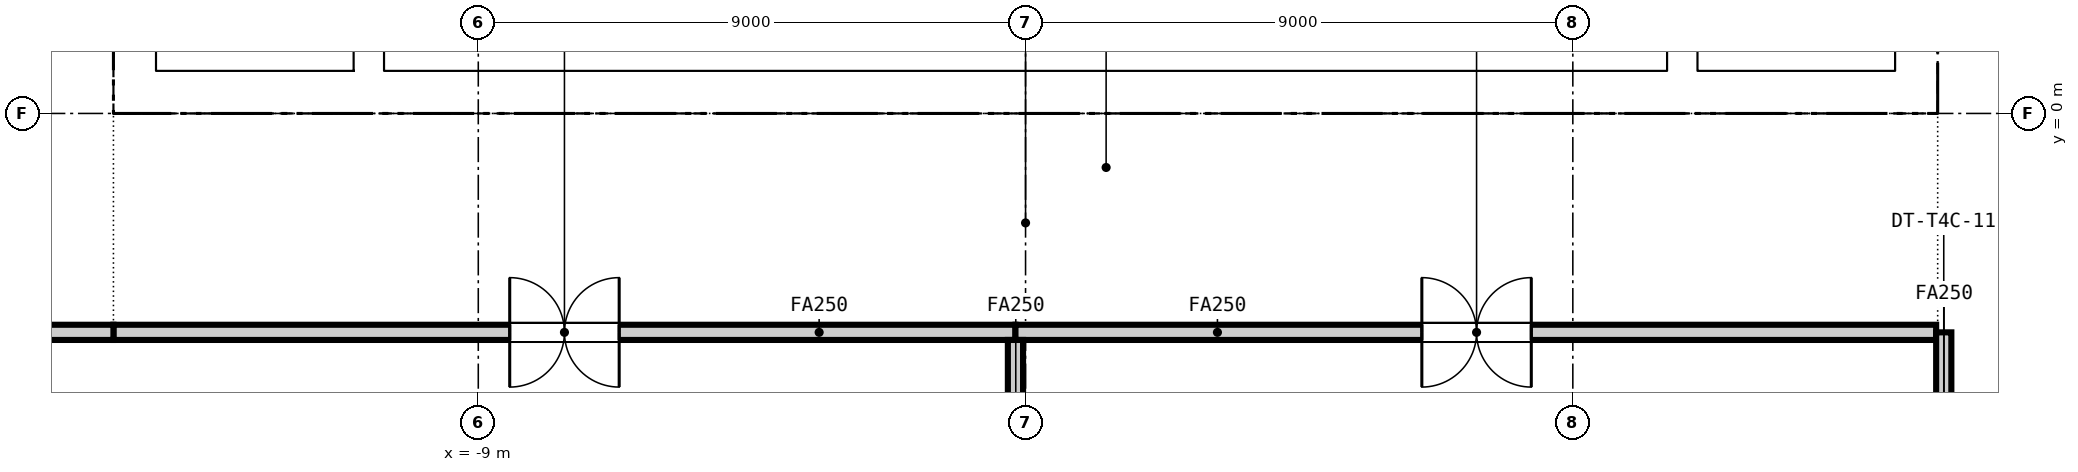
"""IFC4 building model, lengths in metres.
Left out: names, types, materials, properties, quantities, classifications, styles, units other than length and angle.
Written with IfcOpenShell. Run it as: python <this file> out.ifc"""

import sys

from ifc_helpers import new_model, si_unit, direction, frame, frame_2d, origin, place, context, subcontext, project, spatial, rectangle, extrude, element, fill, save


model = new_model("IFC4")
c1 = context("Model", 3, precision=1e-05, world=origin(), true_north=direction((0.0, 1.0)))
c2 = subcontext(c1, "Body", "Model", "MODEL_VIEW")
j1 = project(units=[si_unit("LENGTHUNIT", "METRE"), si_unit("PLANEANGLEUNIT", "RADIAN")], contexts=[c1])
p1 = place(None, origin())
s1 = spatial("IfcSite", under=j1, at=p1, CompositionType="ELEMENT")
p2 = place(p1, origin())
s2 = spatial("IfcBuilding", under=s1, at=p2, CompositionType="ELEMENT")
p3 = place(p2, frame((0.0, 0.0, 192.7)))
s3 = spatial("IfcBuildingStorey", under=s2, at=p3, CompositionType="ELEMENT", Elevation=192.7)
p4 = place(p3, frame((-15.0, 0.35, -0.15), z_axis=(0.0, 0.0, 1.0), x_axis=(1.0, 0.0, 0.0)))
e1 = element("IfcWall", 1, at=p4, inside=s3, PredefinedType="SOLIDWALL", context=c2, shape_type="SweptSolid", body=[
    extrude(rectangle(XDim=30.0, YDim=0.7, at=frame_2d((15.0, 0.0))), origin(), (0.0, 0.0, 1.0), 3.65),
])
p5 = place(p4, frame((5.8, 0.0, 0.15)))
e2 = element("IfcOpeningElement", 2, at=p5, cuts=e1, PredefinedType="OPENING", context=c2, shape_type="SweptSolid", body=[
    extrude(rectangle(XDim=2.4, YDim=2.4, at=frame_2d((1.2, 1.2))), frame((0.0, 0.36, 0.0), z_axis=(0.0, -1.0, 0.0), x_axis=(1.0, 0.0, 0.0)), (0.0, 0.0, 1.0), 0.72),
])
p6 = place(p4, frame((13.8, 0.0, 0.15)))
e3 = element("IfcOpeningElement", 3, at=p6, cuts=e1, PredefinedType="OPENING", context=c2, shape_type="SweptSolid", body=[
    extrude(rectangle(XDim=2.4, YDim=2.4, at=frame_2d((1.2, 1.2))), frame((0.0, 0.36, 0.0), z_axis=(0.0, -1.0, 0.0), x_axis=(1.0, 0.0, 0.0)), (0.0, 0.0, 1.0), 0.72),
])
p7 = place(p4, frame((21.8, 0.0, 0.15)))
e4 = element("IfcOpeningElement", 4, at=p7, cuts=e1, PredefinedType="OPENING", context=c2, shape_type="SweptSolid", body=[
    extrude(rectangle(XDim=2.4, YDim=2.4, at=frame_2d((1.2, 1.2))), frame((0.0, 0.36, 0.0), z_axis=(0.0, -1.0, 0.0), x_axis=(1.0, 0.0, 0.0)), (0.0, 0.0, 1.0), 0.72),
])
p8 = place(p4, frame((1.5, 0.0, 0.15)))
e5 = element("IfcOpeningElement", 5, at=p8, cuts=e1, PredefinedType="OPENING", context=c2, shape_type="SweptSolid", body=[
    extrude(rectangle(XDim=1.2, YDim=2.1, at=frame_2d((0.6, 1.05))), frame((0.0, 0.36, 0.0), z_axis=(0.0, -1.0, 0.0), x_axis=(1.0, 0.0, 0.0)), (0.0, 0.0, 1.0), 0.72),
])
p9 = place(p4, frame((27.3, 0.0, 0.15)))
e6 = element("IfcOpeningElement", 6, at=p9, cuts=e1, PredefinedType="OPENING", context=c2, shape_type="SweptSolid", body=[
    extrude(rectangle(XDim=1.2, YDim=2.1, at=frame_2d((0.6, 1.05))), frame((0.0, 0.36, 0.0), z_axis=(0.0, -1.0, 0.0), x_axis=(1.0, 0.0, 0.0)), (0.0, 0.0, 1.0), 0.72),
])
for number, where, z_axis, x_axis in (
    (7, (-14.65, 0.7, -0.15), (0.0, 0.0, 1.0), (0.0, 1.0, 0.0)),
    (8, (14.65, 0.7, -0.15), (0.0, 0.0, 1.0), (0.0, 1.0, 0.0)),
):
    element("IfcWall", number, at=place(p3, frame(where, z_axis=z_axis, x_axis=x_axis)), inside=s3, PredefinedType="SOLIDWALL", context=c2, shape_type="SweptSolid", body=[
        extrude(rectangle(XDim=13.6, YDim=0.7, at=frame_2d((6.8, 0.0))), origin(), (0.0, 0.0, 1.0), 3.65),
    ])
for number, where, z_axis, x_axis in (
    (9, (-10.8, 0.7, -0.15), (0.0, 0.0, 1.0), (0.0, 1.0, 0.0)),
    (10, (10.8, 0.7, -0.15), (0.0, 0.0, 1.0), (0.0, 1.0, 0.0)),
):
    element("IfcWall", number, at=place(p3, frame(where, z_axis=z_axis, x_axis=x_axis)), inside=s3, PredefinedType="SOLIDWALL", context=c2, shape_type="SweptSolid", body=[
        extrude(rectangle(XDim=13.6, YDim=0.5, at=frame_2d((6.8, 0.0))), origin(), (0.0, 0.0, 1.0), 3.65),
    ])
for number, where, z_axis, x_axis in (
    (11, (-14.15, 0.7, 0.0), (0.0, 0.0, 1.0), (0.0, 1.0, 0.0)),
    (12, (14.15, 0.7, 0.0), (0.0, 0.0, 1.0), (0.0, 1.0, 0.0)),
):
    element("IfcWall", number, at=place(p3, frame(where, z_axis=z_axis, x_axis=x_axis)), inside=s3, PredefinedType="SOLIDWALL", context=c2, shape_type="SweptSolid", body=[
        extrude(rectangle(XDim=13.6, YDim=0.3, at=frame_2d((6.8, 0.0))), origin(), (0.0, 0.0, 1.0), 3.5),
    ])
p10 = place(p3, frame((-0.166, -3.6, 0.0), z_axis=(0.0, 0.0, 1.0), x_axis=(-1.0, 0.0, 0.0)))
e13 = element("IfcWall", 13, at=p10, inside=s3, PredefinedType="PARTITIONING", context=c2, shape_type="SweptSolid", body=[
    extrude(rectangle(XDim=14.834, YDim=0.25, at=frame_2d((7.417, 0.0))), origin(), (0.0, 0.0, 1.0), 2.741),
])
p11 = place(p10, frame((6.517, 0.0, 0.0)))
e14 = element("IfcOpeningElement", 14, at=p11, cuts=e13, PredefinedType="OPENING", context=c2, shape_type="SweptSolid", body=[
    extrude(rectangle(XDim=1.8, YDim=2.1, at=frame_2d((0.9, 1.05))), frame((0.0, 0.135, 0.0), z_axis=(0.0, -1.0, 0.0), x_axis=(1.0, 0.0, 0.0)), (0.0, 0.0, 1.0), 0.27),
])
p12 = place(p3, frame((14.975, -3.6, 0.0), z_axis=(0.0, 0.0, 1.0), x_axis=(-1.0, 0.0, 0.0)))
e15 = element("IfcWall", 15, at=p12, inside=s3, PredefinedType="PARTITIONING", context=c2, shape_type="SweptSolid", body=[
    extrude(rectangle(XDim=15.141, YDim=0.25, at=frame_2d((7.571, 0.0))), origin(), (0.0, 0.0, 1.0), 2.741),
])
p13 = place(p12, frame((6.658, 0.0, 0.0)))
e16 = element("IfcOpeningElement", 16, at=p13, cuts=e15, PredefinedType="OPENING", context=c2, shape_type="SweptSolid", body=[
    extrude(rectangle(XDim=1.8, YDim=2.1, at=frame_2d((0.9, 1.05))), frame((0.0, 0.135, 0.0), z_axis=(0.0, -1.0, 0.0), x_axis=(1.0, 0.0, 0.0)), (0.0, 0.0, 1.0), 0.27),
])
p14 = place(p3, frame((-15.0, -3.6, 0.0), z_axis=(0.0, 0.0, 1.0), x_axis=(-1.0, 0.0, 0.0)))
e17 = element("IfcWall", 17, at=p14, inside=s3, PredefinedType="PARTITIONING", context=c2, shape_type="SweptSolid", body=[
    extrude(rectangle(XDim=3.4, YDim=0.25, at=frame_2d((1.7, 0.0))), origin(), (0.0, 0.0, 1.0), 2.741),
])
p15 = place(p3, frame((-0.166, -8.85, 0.0), z_axis=(0.0, 0.0, 1.0), x_axis=(0.0, 1.0, 0.0)))
e18 = element("IfcWall", 18, at=p15, inside=s3, PredefinedType="PARTITIONING", context=c2, shape_type="SweptSolid", body=[
    extrude(rectangle(XDim=5.125, YDim=0.25, at=frame_2d((2.562, 0.0))), origin(), (0.0, 0.0, 1.0), 2.741),
])
p16 = place(p3, frame((15.1, -15.475, 0.0), z_axis=(0.0, 0.0, 1.0), x_axis=(0.0, 1.0, 0.0)))
e19 = element("IfcWall", 19, at=p16, inside=s3, PredefinedType="PARTITIONING", context=c2, shape_type="SweptSolid", body=[
    extrude(rectangle(XDim=11.875, YDim=0.25, at=frame_2d((5.938, 0.0))), origin(), (0.0, 0.0, 1.0), 2.741),
])
p17 = place(p16, frame((5.038, 0.0, 0.0)))
e20 = element("IfcOpeningElement", 20, at=p17, cuts=e19, PredefinedType="OPENING", context=c2, shape_type="SweptSolid", body=[
    extrude(rectangle(XDim=1.8, YDim=2.1, at=frame_2d((0.9, 1.05))), frame((0.0, 0.135, 0.0), z_axis=(0.0, -1.0, 0.0), x_axis=(1.0, 0.0, 0.0)), (0.0, 0.0, 1.0), 0.27),
])
p18 = place(p5, origin())
e21 = element("IfcDoor", 21, at=p18, inside=s3, OperationType="DOUBLE_DOOR_DOUBLE_SWING", PredefinedType="DOOR", context=c2, shape_type="SweptSolid", body=[
    extrude(rectangle(XDim=2.4, YDim=2.4, at=frame_2d((1.2, 1.2))), frame((0.0, 0.025, 0.0), z_axis=(0.0, -1.0, 0.0), x_axis=(1.0, 0.0, 0.0)), (0.0, 0.0, 1.0), 0.05),
])
fill(e2, e21)
p19 = place(p6, origin())
e22 = element("IfcDoor", 22, at=p19, inside=s3, OperationType="DOUBLE_DOOR_DOUBLE_SWING", PredefinedType="DOOR", context=c2, shape_type="SweptSolid", body=[
    extrude(rectangle(XDim=2.4, YDim=2.4, at=frame_2d((1.2, 1.2))), frame((0.0, 0.025, 0.0), z_axis=(0.0, -1.0, 0.0), x_axis=(1.0, 0.0, 0.0)), (0.0, 0.0, 1.0), 0.05),
])
fill(e3, e22)
p20 = place(p7, origin())
e23 = element("IfcDoor", 23, at=p20, inside=s3, OperationType="DOUBLE_DOOR_DOUBLE_SWING", PredefinedType="DOOR", context=c2, shape_type="SweptSolid", body=[
    extrude(rectangle(XDim=2.4, YDim=2.4, at=frame_2d((1.2, 1.2))), frame((0.0, 0.025, 0.0), z_axis=(0.0, -1.0, 0.0), x_axis=(1.0, 0.0, 0.0)), (0.0, 0.0, 1.0), 0.05),
])
fill(e4, e23)
p21 = place(p8, origin())
e24 = element("IfcDoor", 24, at=p21, inside=s3, OperationType="SINGLE_SWING_LEFT", PredefinedType="DOOR", context=c2, shape_type="SweptSolid", body=[
    extrude(rectangle(XDim=1.2, YDim=2.1, at=frame_2d((0.6, 1.05))), frame((0.0, 0.025, 0.0), z_axis=(0.0, -1.0, 0.0), x_axis=(1.0, 0.0, 0.0)), (0.0, 0.0, 1.0), 0.05),
])
fill(e5, e24)
p22 = place(p9, origin())
e25 = element("IfcDoor", 25, at=p22, inside=s3, OperationType="SINGLE_SWING_RIGHT", PredefinedType="DOOR", context=c2, shape_type="SweptSolid", body=[
    extrude(rectangle(XDim=1.2, YDim=2.1, at=frame_2d((0.6, 1.05))), frame((0.0, 0.025, 0.0), z_axis=(0.0, -1.0, 0.0), x_axis=(1.0, 0.0, 0.0)), (0.0, 0.0, 1.0), 0.05),
])
fill(e6, e25)
p23 = place(p11, origin())
e26 = element("IfcDoor", 26, at=p23, inside=s3, OperationType="DOUBLE_DOOR_DOUBLE_SWING", PredefinedType="DOOR", context=c2, shape_type="SweptSolid", body=[
    extrude(rectangle(XDim=1.8, YDim=2.1, at=frame_2d((0.9, 1.05))), frame((0.0, 0.025, 0.0), z_axis=(0.0, -1.0, 0.0), x_axis=(1.0, 0.0, 0.0)), (0.0, 0.0, 1.0), 0.05),
])
fill(e14, e26)
p24 = place(p13, origin())
e27 = element("IfcDoor", 27, at=p24, inside=s3, OperationType="DOUBLE_DOOR_DOUBLE_SWING", PredefinedType="DOOR", context=c2, shape_type="SweptSolid", body=[
    extrude(rectangle(XDim=1.8, YDim=2.1, at=frame_2d((0.9, 1.05))), frame((0.0, 0.025, 0.0), z_axis=(0.0, -1.0, 0.0), x_axis=(1.0, 0.0, 0.0)), (0.0, 0.0, 1.0), 0.05),
])
fill(e16, e27)
save(model, sys.argv[1])
